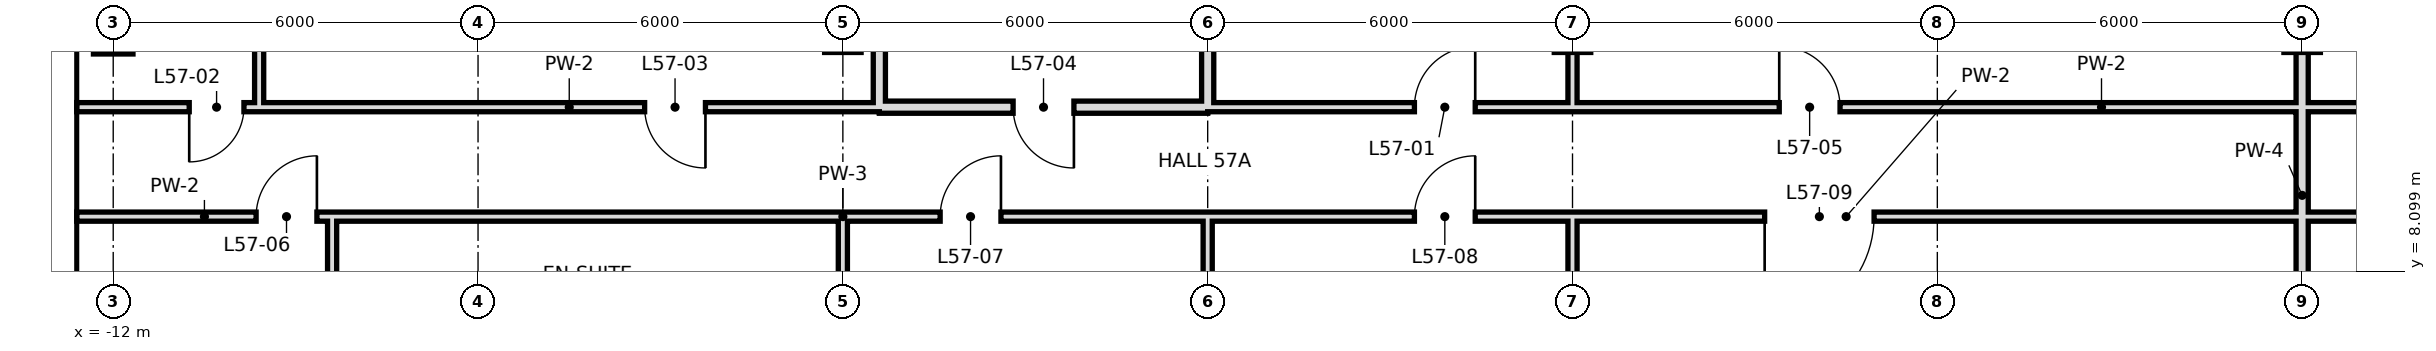
"""IFC4 building model, lengths in metres.
Left out: names, types, materials, properties, quantities, classifications, styles, units other than length and angle.
Written with IfcOpenShell. Run it as: python <this file> out.ifc"""

import sys

from ifc_helpers import new_model, si_unit, direction, frame, frame_2d, origin, origin_2d, place, context, subcontext, project, spatial, rectangle, hollow_rectangle, extrude, element, fill, save


model = new_model("IFC4")
c1 = context("Model", 3, precision=1e-05, world=origin(), true_north=direction((0.0, 1.0)))
c2 = subcontext(c1, "Body", "Model", "MODEL_VIEW")
j1 = project(units=[si_unit("LENGTHUNIT", "METRE"), si_unit("PLANEANGLEUNIT", "RADIAN")], contexts=[c1])
p1 = place(None, origin())
s1 = spatial("IfcSite", under=j1, at=p1, CompositionType="ELEMENT")
p2 = place(p1, origin())
s2 = spatial("IfcBuilding", under=s1, at=p2, CompositionType="ELEMENT")
p3 = place(p2, frame((0.0, 0.0, 243.2)))
s3 = spatial("IfcBuildingStorey", under=s2, at=p3, CompositionType="ELEMENT", Elevation=243.2)
p4 = place(p3, frame((-12.0, 12.0, 0.0), z_axis=(0.0, 0.0, 1.0), x_axis=(1.0, 0.0, 0.0)))
e1 = element("IfcColumn", 1, at=p4, inside=s3, PredefinedType="COLUMN", context=c2, shape_type="SweptSolid", body=[
    extrude(hollow_rectangle(XDim=0.65, YDim=0.65, WallThickness=0.032, at=origin_2d()), origin(), (0.0, 0.0, 1.0), 3.6),
])
p5 = place(p3, frame((-8.4, 6.0, 0.0), z_axis=(0.0, 0.0, 1.0), x_axis=(0.0, 1.0, 0.0)))
e2 = element("IfcWall", 2, at=p5, inside=s3, PredefinedType="PARTITIONING", context=c2, shape_type="SweptSolid", body=[
    extrude(rectangle(XDim=3.0, YDim=0.15, at=frame_2d((1.5, 0.0))), origin(), (0.0, 0.0, 1.0), 3.42),
])
p6 = place(p3, frame((-9.6, 10.8, 0.0), z_axis=(0.0, 0.0, 1.0), x_axis=(0.0, 1.0, 0.0)))
e3 = element("IfcWall", 3, at=p6, inside=s3, PredefinedType="PARTITIONING", context=c2, shape_type="SweptSolid", body=[
    extrude(rectangle(XDim=7.2, YDim=0.15, at=frame_2d((3.6, 0.0))), origin(), (0.0, 0.0, 1.0), 3.42),
])
p7 = place(p3, frame((0.0, 6.0, 0.0), z_axis=(0.0, 0.0, 1.0), x_axis=(0.0, 1.0, 0.0)))
e4 = element("IfcWall", 4, at=p7, inside=s3, PredefinedType="PARTITIONING", context=c2, shape_type="SweptSolid", body=[
    extrude(rectangle(XDim=3.0, YDim=0.15, at=frame_2d((1.5, 0.0))), origin(), (0.0, 0.0, 1.0), 2.72),
])
p8 = place(p3, frame((0.6, 10.8, 0.0), z_axis=(0.0, 0.0, 1.0), x_axis=(0.0, 1.0, 0.0)))
e5 = element("IfcWall", 5, at=p8, inside=s3, PredefinedType="SOLIDWALL", context=c2, shape_type="SweptSolid", body=[
    extrude(rectangle(XDim=7.2, YDim=0.2, at=frame_2d((3.6, 0.0))), origin(), (0.0, 0.0, 1.0), 2.72),
])
p9 = place(p3, frame((12.0, 0.0, 0.0), z_axis=(0.0, 0.0, 1.0), x_axis=(0.0, 1.0, 0.0)))
e6 = element("IfcWall", 6, at=p9, inside=s3, PredefinedType="PARTITIONING", context=c2, shape_type="SweptSolid", body=[
    extrude(rectangle(XDim=9.0, YDim=0.15, at=frame_2d((4.5, 0.0))), origin(), (0.0, 0.0, 1.0), 2.72),
])
p10 = place(p3, frame((12.0, 10.8, 0.0), z_axis=(0.0, 0.0, 1.0), x_axis=(0.0, 1.0, 0.0)))
e7 = element("IfcWall", 7, at=p10, inside=s3, PredefinedType="PARTITIONING", context=c2, shape_type="SweptSolid", body=[
    extrude(rectangle(XDim=7.9, YDim=0.15, at=frame_2d((3.95, 0.0))), origin(), (0.0, 0.0, 1.0), 2.72),
])
p11 = place(p3, frame((24.0, 0.0, 0.0), z_axis=(0.0, 0.0, 1.0), x_axis=(0.0, 1.0, 0.0)))
e8 = element("IfcWall", 8, at=p11, inside=s3, PredefinedType="SOLIDWALL", context=c2, shape_type="SweptSolid", body=[
    extrude(rectangle(XDim=18.7, YDim=0.2, at=frame_2d((9.35, 0.0))), origin(), (0.0, 0.0, 1.0), 2.72),
])
p12 = place(p3, frame((6.0, 10.8, 0.0), z_axis=(0.0, 0.0, 1.0), x_axis=(0.0, 1.0, 0.0)))
e9 = element("IfcWall", 9, at=p12, inside=s3, PredefinedType="SOLIDWALL", context=c2, shape_type="SweptSolid", body=[
    extrude(rectangle(XDim=7.9, YDim=0.2, at=frame_2d((3.95, 0.0))), origin(), (0.0, 0.0, 1.0), 2.72),
])
p13 = place(p3, frame((6.0, -0.6, 0.0), z_axis=(0.0, 0.0, 1.0), x_axis=(0.0, 1.0, 0.0)))
e10 = element("IfcWall", 10, at=p13, inside=s3, PredefinedType="PARTITIONING", context=c2, shape_type="SweptSolid", body=[
    extrude(rectangle(XDim=9.6, YDim=0.15, at=frame_2d((4.8, 0.0))), origin(), (0.0, 0.0, 1.0), 2.72),
])
p14 = place(p3, frame((0.6, 10.8, 0.0), z_axis=(0.0, 0.0, 1.0), x_axis=(1.0, 0.0, 0.0)))
e11 = element("IfcWall", 11, at=p14, inside=s3, PredefinedType="SOLIDWALL", context=c2, shape_type="SweptSolid", body=[
    extrude(rectangle(XDim=5.4, YDim=0.2, at=frame_2d((2.7, 0.0))), origin(), (0.0, 0.0, 1.0), 2.72),
])
p15 = place(p14, frame((2.2, 0.0, 0.0)))
e12 = element("IfcOpeningElement", 12, at=p15, cuts=e11, PredefinedType="OPENING", context=c2, shape_type="SweptSolid", body=[
    extrude(rectangle(XDim=1.0, YDim=2.4, at=frame_2d((0.5, 1.2))), frame((0.0, 0.11, 0.0), z_axis=(0.0, -1.0, 0.0), x_axis=(1.0, 0.0, 0.0)), (0.0, 0.0, 1.0), 0.22),
])
p16 = place(p3, frame((-9.6, 10.8, 0.0), z_axis=(0.0, 0.0, 1.0), x_axis=(1.0, 0.0, 0.0)))
e13 = element("IfcWall", 13, at=p16, inside=s3, PredefinedType="PARTITIONING", context=c2, shape_type="SweptSolid", body=[
    extrude(rectangle(XDim=10.2, YDim=0.15, at=frame_2d((5.1, 0.0))), origin(), (0.0, 0.0, 1.0), 3.42),
])
p17 = place(p16, frame((6.34, 0.0, 0.0)))
e14 = element("IfcOpeningElement", 14, at=p17, cuts=e13, PredefinedType="OPENING", context=c2, shape_type="SweptSolid", body=[
    extrude(rectangle(XDim=1.0, YDim=2.4, at=frame_2d((0.5, 1.2))), frame((0.0, 0.085, 0.0), z_axis=(0.0, -1.0, 0.0), x_axis=(1.0, 0.0, 0.0)), (0.0, 0.0, 1.0), 0.17),
])
p18 = place(p3, frame((6.0, 10.8, 0.0), z_axis=(0.0, 0.0, 1.0), x_axis=(1.0, 0.0, 0.0)))
e15 = element("IfcWall", 15, at=p18, inside=s3, PredefinedType="PARTITIONING", context=c2, shape_type="SweptSolid", body=[
    extrude(rectangle(XDim=29.4, YDim=0.15, at=frame_2d((14.7, 0.0))), origin(), (0.0, 0.0, 1.0), 3.42),
])
p19 = place(p18, frame((3.4, 0.0, 0.0)))
e16 = element("IfcOpeningElement", 16, at=p19, cuts=e15, PredefinedType="OPENING", context=c2, shape_type="SweptSolid", body=[
    extrude(rectangle(XDim=1.0, YDim=2.4, at=frame_2d((0.5, 1.2))), frame((0.0, 0.085, 0.0), z_axis=(0.0, -1.0, 0.0), x_axis=(1.0, 0.0, 0.0)), (0.0, 0.0, 1.0), 0.17),
])
p20 = place(p18, frame((9.4, 0.0, 0.0)))
e17 = element("IfcOpeningElement", 17, at=p20, cuts=e15, PredefinedType="OPENING", context=c2, shape_type="SweptSolid", body=[
    extrude(rectangle(XDim=1.0, YDim=2.4, at=frame_2d((0.5, 1.2))), frame((0.0, 0.085, 0.0), z_axis=(0.0, -1.0, 0.0), x_axis=(1.0, 0.0, 0.0)), (0.0, 0.0, 1.0), 0.17),
])
p21 = place(p18, frame((19.3, 0.0, 0.0)))
e18 = element("IfcOpeningElement", 18, at=p21, cuts=e15, PredefinedType="OPENING", context=c2, shape_type="SweptSolid", body=[
    extrude(rectangle(XDim=1.0, YDim=2.4, at=frame_2d((0.5, 1.2))), frame((0.0, 0.085, 0.0), z_axis=(0.0, -1.0, 0.0), x_axis=(1.0, 0.0, 0.0)), (0.0, 0.0, 1.0), 0.17),
])
p22 = place(p18, frame((25.0, 0.0, 0.0)))
e19 = element("IfcOpeningElement", 19, at=p22, cuts=e15, PredefinedType="OPENING", context=c2, shape_type="SweptSolid", body=[
    extrude(rectangle(XDim=1.0, YDim=2.4, at=frame_2d((0.5, 1.2))), frame((0.0, 0.085, 0.0), z_axis=(0.0, -1.0, 0.0), x_axis=(1.0, 0.0, 0.0)), (0.0, 0.0, 1.0), 0.17),
])
p23 = place(p3, frame((-12.6, 10.8, 0.0), z_axis=(0.0, 0.0, 1.0), x_axis=(1.0, 0.0, 0.0)))
e20 = element("IfcWall", 20, at=p23, inside=s3, PredefinedType="PARTITIONING", context=c2, shape_type="SweptSolid", body=[
    extrude(rectangle(XDim=3.0, YDim=0.15, at=frame_2d((1.5, 0.0))), origin(), (0.0, 0.0, 1.0), 3.42),
])
p24 = place(p23, frame((1.85, 0.0, 0.0)))
e21 = element("IfcOpeningElement", 21, at=p24, cuts=e20, PredefinedType="OPENING", context=c2, shape_type="SweptSolid", body=[
    extrude(rectangle(XDim=0.9, YDim=2.4, at=frame_2d((0.45, 1.2))), frame((0.0, 0.085, 0.0), z_axis=(0.0, -1.0, 0.0), x_axis=(1.0, 0.0, 0.0)), (0.0, 0.0, 1.0), 0.17),
])
p25 = place(p3, frame((-12.6, 9.0, 0.0), z_axis=(0.0, 0.0, 1.0), x_axis=(1.0, 0.0, 0.0)))
e22 = element("IfcWall", 22, at=p25, inside=s3, PredefinedType="PARTITIONING", context=c2, shape_type="SweptSolid", body=[
    extrude(rectangle(XDim=4.2, YDim=0.15, at=frame_2d((2.1, 0.0))), origin(), (0.0, 0.0, 1.0), 3.42),
])
p26 = place(p25, frame((2.95, 0.0, 0.0)))
e23 = element("IfcOpeningElement", 23, at=p26, cuts=e22, PredefinedType="OPENING", context=c2, shape_type="SweptSolid", body=[
    extrude(rectangle(XDim=1.0, YDim=2.4, at=frame_2d((0.5, 1.2))), frame((0.0, 0.085, 0.0), z_axis=(0.0, -1.0, 0.0), x_axis=(1.0, 0.0, 0.0)), (0.0, 0.0, 1.0), 0.17),
])
p27 = place(p3, frame((0.0, 9.0, 0.0), z_axis=(0.0, 0.0, 1.0), x_axis=(1.0, 0.0, 0.0)))
e24 = element("IfcWall", 24, at=p27, inside=s3, PredefinedType="PARTITIONING", context=c2, shape_type="SweptSolid", body=[
    extrude(rectangle(XDim=33.0, YDim=0.15, at=frame_2d((16.5, 0.0))), origin(), (0.0, 0.0, 1.0), 3.42),
])
p28 = place(p27, frame((1.6, 0.0, 0.0)))
e25 = element("IfcOpeningElement", 25, at=p28, cuts=e24, PredefinedType="OPENING", context=c2, shape_type="SweptSolid", body=[
    extrude(rectangle(XDim=1.0, YDim=2.4, at=frame_2d((0.5, 1.2))), frame((0.0, 0.085, 0.0), z_axis=(0.0, -1.0, 0.0), x_axis=(1.0, 0.0, 0.0)), (0.0, 0.0, 1.0), 0.17),
])
p29 = place(p27, frame((9.4, 0.0, 0.0)))
e26 = element("IfcOpeningElement", 26, at=p29, cuts=e24, PredefinedType="OPENING", context=c2, shape_type="SweptSolid", body=[
    extrude(rectangle(XDim=1.0, YDim=2.4, at=frame_2d((0.5, 1.2))), frame((0.0, 0.085, 0.0), z_axis=(0.0, -1.0, 0.0), x_axis=(1.0, 0.0, 0.0)), (0.0, 0.0, 1.0), 0.17),
])
p30 = place(p27, frame((15.16, 0.0, 0.0)))
e27 = element("IfcOpeningElement", 27, at=p30, cuts=e24, PredefinedType="OPENING", context=c2, shape_type="SweptSolid", body=[
    extrude(rectangle(XDim=1.8, YDim=2.4, at=frame_2d((0.9, 1.2))), frame((0.0, 0.085, 0.0), z_axis=(0.0, -1.0, 0.0), x_axis=(1.0, 0.0, 0.0)), (0.0, 0.0, 1.0), 0.17),
])
p31 = place(p27, frame((26.1, 0.0, 0.0)))
e28 = element("IfcOpeningElement", 28, at=p31, cuts=e24, PredefinedType="OPENING", context=c2, shape_type="SweptSolid", body=[
    extrude(rectangle(XDim=1.8, YDim=2.4, at=frame_2d((0.9, 1.2))), frame((0.0, 0.085, 0.0), z_axis=(0.0, -1.0, 0.0), x_axis=(1.0, 0.0, 0.0)), (0.0, 0.0, 1.0), 0.17),
])
p32 = place(p27, frame((30.7, 0.0, 0.0)))
e29 = element("IfcOpeningElement", 29, at=p32, cuts=e24, PredefinedType="OPENING", context=c2, shape_type="SweptSolid", body=[
    extrude(rectangle(XDim=1.0, YDim=2.4, at=frame_2d((0.5, 1.2))), frame((0.0, 0.085, 0.0), z_axis=(0.0, -1.0, 0.0), x_axis=(1.0, 0.0, 0.0)), (0.0, 0.0, 1.0), 0.17),
])
p33 = place(p3, frame((-8.4, 9.0, 0.0), z_axis=(0.0, 0.0, 1.0), x_axis=(1.0, 0.0, 0.0)))
e30 = element("IfcWall", 30, at=p33, inside=s3, PredefinedType="PARTITIONING", context=c2, shape_type="SweptSolid", body=[
    extrude(rectangle(XDim=8.4, YDim=0.15, at=frame_2d((4.2, 0.0))), origin(), (0.0, 0.0, 1.0), 3.42),
])
p34 = place(p19, frame((1.0, 0.0, 0.0), z_axis=(0.0, 0.0, 1.0), x_axis=(-1.0, 0.0, 0.0)))
e31 = element("IfcDoor", 31, at=p34, inside=s3, OperationType="SINGLE_SWING_LEFT", PredefinedType="DOOR", context=c2, shape_type="SweptSolid", body=[
    extrude(rectangle(XDim=1.0, YDim=2.4, at=frame_2d((0.5, 1.2))), frame((0.0, 0.025, 0.0), z_axis=(0.0, -1.0, 0.0), x_axis=(1.0, 0.0, 0.0)), (0.0, 0.0, 1.0), 0.05),
])
fill(e16, e31)
p35 = place(p24, frame((0.9, 0.0, 0.0), z_axis=(0.0, 0.0, 1.0), x_axis=(-1.0, 0.0, 0.0)))
e32 = element("IfcDoor", 32, at=p35, inside=s3, OperationType="SINGLE_SWING_RIGHT", PredefinedType="DOOR", context=c2, shape_type="SweptSolid", body=[
    extrude(rectangle(XDim=0.9, YDim=2.4, at=frame_2d((0.45, 1.2))), frame((0.0, 0.025, 0.0), z_axis=(0.0, -1.0, 0.0), x_axis=(1.0, 0.0, 0.0)), (0.0, 0.0, 1.0), 0.05),
])
fill(e21, e32)
p36 = place(p17, origin())
e33 = element("IfcDoor", 33, at=p36, inside=s3, OperationType="SINGLE_SWING_RIGHT", PredefinedType="DOOR", context=c2, shape_type="SweptSolid", body=[
    extrude(rectangle(XDim=1.0, YDim=2.4, at=frame_2d((0.5, 1.2))), frame((0.0, 0.025, 0.0), z_axis=(0.0, -1.0, 0.0), x_axis=(1.0, 0.0, 0.0)), (0.0, 0.0, 1.0), 0.05),
])
fill(e14, e33)
p37 = place(p15, origin())
e34 = element("IfcDoor", 34, at=p37, inside=s3, OperationType="SINGLE_SWING_RIGHT", PredefinedType="DOOR", context=c2, shape_type="SweptSolid", body=[
    extrude(rectangle(XDim=1.0, YDim=2.4, at=frame_2d((0.5, 1.2))), frame((0.0, 0.025, 0.0), z_axis=(0.0, -1.0, 0.0), x_axis=(1.0, 0.0, 0.0)), (0.0, 0.0, 1.0), 0.05),
])
fill(e12, e34)
p38 = place(p20, origin())
e35 = element("IfcDoor", 35, at=p38, inside=s3, OperationType="SINGLE_SWING_LEFT", PredefinedType="DOOR", context=c2, shape_type="SweptSolid", body=[
    extrude(rectangle(XDim=1.0, YDim=2.4, at=frame_2d((0.5, 1.2))), frame((0.0, 0.025, 0.0), z_axis=(0.0, -1.0, 0.0), x_axis=(1.0, 0.0, 0.0)), (0.0, 0.0, 1.0), 0.05),
])
fill(e17, e35)
p39 = place(p26, frame((1.0, 0.0, 0.0), z_axis=(0.0, 0.0, 1.0), x_axis=(-1.0, 0.0, 0.0)))
e36 = element("IfcDoor", 36, at=p39, inside=s3, OperationType="SINGLE_SWING_LEFT", PredefinedType="DOOR", context=c2, shape_type="SweptSolid", body=[
    extrude(rectangle(XDim=1.0, YDim=2.4, at=frame_2d((0.5, 1.2))), frame((0.0, 0.025, 0.0), z_axis=(0.0, -1.0, 0.0), x_axis=(1.0, 0.0, 0.0)), (0.0, 0.0, 1.0), 0.05),
])
fill(e23, e36)
p40 = place(p28, frame((1.0, 0.0, 0.0), z_axis=(0.0, 0.0, 1.0), x_axis=(-1.0, 0.0, 0.0)))
e37 = element("IfcDoor", 37, at=p40, inside=s3, OperationType="SINGLE_SWING_LEFT", PredefinedType="DOOR", context=c2, shape_type="SweptSolid", body=[
    extrude(rectangle(XDim=1.0, YDim=2.4, at=frame_2d((0.5, 1.2))), frame((0.0, 0.025, 0.0), z_axis=(0.0, -1.0, 0.0), x_axis=(1.0, 0.0, 0.0)), (0.0, 0.0, 1.0), 0.05),
])
fill(e25, e37)
p41 = place(p29, frame((1.0, 0.0, 0.0), z_axis=(0.0, 0.0, 1.0), x_axis=(-1.0, 0.0, 0.0)))
e38 = element("IfcDoor", 38, at=p41, inside=s3, OperationType="SINGLE_SWING_LEFT", PredefinedType="DOOR", context=c2, shape_type="SweptSolid", body=[
    extrude(rectangle(XDim=1.0, YDim=2.4, at=frame_2d((0.5, 1.2))), frame((0.0, 0.025, 0.0), z_axis=(0.0, -1.0, 0.0), x_axis=(1.0, 0.0, 0.0)), (0.0, 0.0, 1.0), 0.05),
])
fill(e26, e38)
p42 = place(p30, frame((1.8, 0.0, 0.0), z_axis=(0.0, 0.0, 1.0), x_axis=(-1.0, 0.0, 0.0)))
e39 = element("IfcDoor", 39, at=p42, inside=s3, OperationType="SINGLE_SWING_RIGHT", PredefinedType="DOOR", context=c2, shape_type="SweptSolid", body=[
    extrude(rectangle(XDim=1.8, YDim=2.4, at=frame_2d((0.9, 1.2))), frame((0.0, 0.025, 0.0), z_axis=(0.0, -1.0, 0.0), x_axis=(1.0, 0.0, 0.0)), (0.0, 0.0, 1.0), 0.05),
])
fill(e27, e39)
save(model, sys.argv[1])
